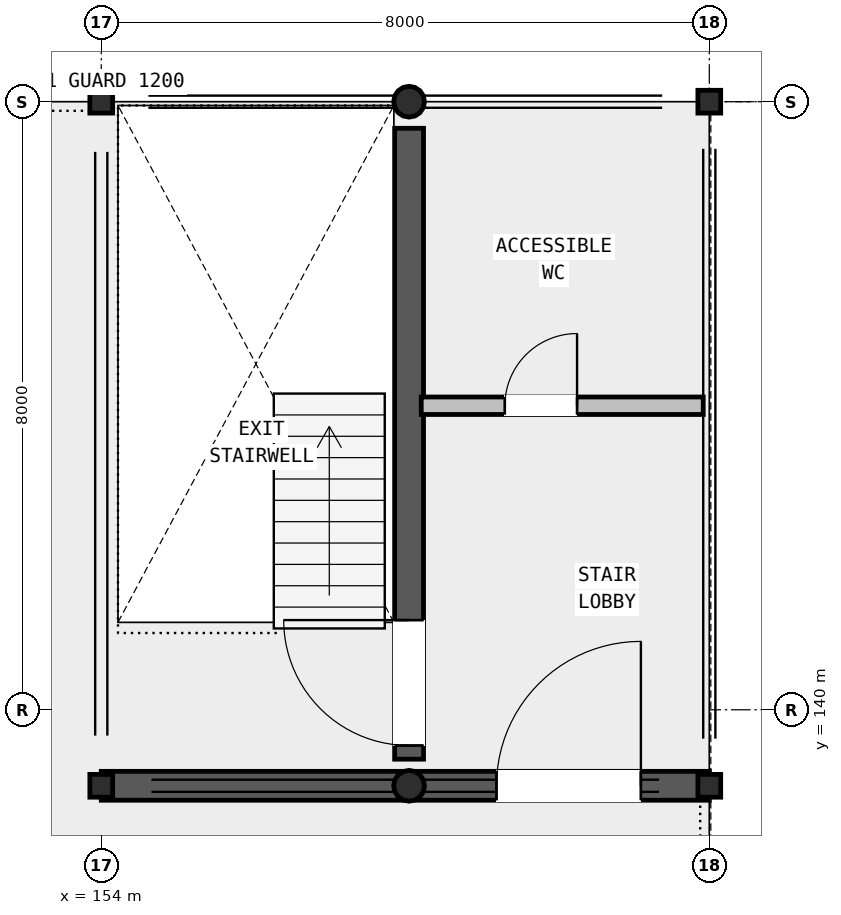
"""IFC4 building model, lengths in metres.
Left out: names, types, materials, properties, quantities, classifications, styles, units other than length and angle.
Written with IfcOpenShell. Run it as: python <this file> out.ifc"""

import sys

from ifc_helpers import new_model, si_unit, direction, frame, frame_2d, origin, origin_2d, place, context, subcontext, project, spatial, rectangle, hollow_circle, i_section, extrude, element, fill, save


model = new_model("IFC4")
c1 = context("Model", 3, precision=1e-05, world=origin(), true_north=direction((0.0, 1.0)))
c2 = subcontext(c1, "Body", "Model", "MODEL_VIEW")
j1 = project(units=[si_unit("LENGTHUNIT", "METRE"), si_unit("PLANEANGLEUNIT", "RADIAN")], contexts=[c1])
p1 = place(None, origin())
s1 = spatial("IfcSite", under=j1, at=p1, CompositionType="ELEMENT")
p2 = place(p1, origin())
s2 = spatial("IfcBuilding", under=s1, at=p2, CompositionType="ELEMENT")
p3 = place(p2, frame((0.0, 0.0, 25.1)))
s3 = spatial("IfcBuildingStorey", under=s2, at=p3, CompositionType="ELEMENT", Elevation=25.1)
for number, where, z_axis, x_axis in (
    (1, (154.0, 148.0, 0.0), (0.0, 0.0, 1.0), (1.0, 0.0, 0.0)),
    (2, (162.0, 148.0, 0.0), (0.0, 0.0, 1.0), (1.0, 0.0, 0.0)),
    (3, (154.0, 139.0, 0.0), (0.0, 0.0, 1.0), (1.0, 0.0, 0.0)),
    (4, (162.0, 139.0, 0.0), (0.0, 0.0, 1.0), (1.0, 0.0, 0.0)),
):
    element("IfcColumn", number, at=place(p3, frame(where, z_axis=z_axis, x_axis=x_axis)), inside=s3, PredefinedType="COLUMN", context=c2, shape_type="SweptSolid", body=[
        extrude(i_section(OverallWidth=0.3, OverallDepth=0.3, WebThickness=0.01, FlangeThickness=0.015, FilletRadius=0.018, at=origin_2d()), origin(), (0.0, 0.0, 1.0), 5.22),
    ])
for number, where, z_axis, x_axis in (
    (5, (158.05, 139.0, 0.0), (0.0, 0.0, 1.0), (1.0, 0.0, 0.0)),
    (6, (158.05, 148.0, 0.0), (0.0, 0.0, 1.0), (1.0, 0.0, 0.0)),
):
    element("IfcColumn", number, at=place(p3, frame(where, z_axis=z_axis, x_axis=x_axis)), inside=s3, PredefinedType="COLUMN", context=c2, shape_type="SweptSolid", body=[
        extrude(hollow_circle(Radius=0.203, WallThickness=0.014, at=origin_2d()), origin(), (0.0, 0.0, 1.0), 5.22),
    ])
p4 = place(p3, frame((154.0, 139.0, 0.0), z_axis=(0.0, 0.0, 1.0), x_axis=(1.0, 0.0, 0.0)))
e7 = element("IfcWall", 7, at=p4, inside=s3, PredefinedType="SHEAR", context=c2, shape_type="SweptSolid", body=[
    extrude(rectangle(XDim=8.0, YDim=0.38, at=frame_2d((4.0, 0.0))), origin(), (0.0, 0.0, 1.0), 2.55),
])
p5 = place(p4, frame((5.2, 0.0, 0.0)))
e8 = element("IfcOpeningElement", 8, at=p5, cuts=e7, PredefinedType="OPENING", context=c2, shape_type="SweptSolid", body=[
    extrude(rectangle(XDim=1.9, YDim=2.3, at=frame_2d((0.95, 1.15))), frame((0.0, 0.2, 0.0), z_axis=(0.0, -1.0, 0.0), x_axis=(1.0, 0.0, 0.0)), (0.0, 0.0, 1.0), 0.4),
])
p6 = place(p3, frame((158.05, 139.35, 0.0), z_axis=(0.0, 0.0, 1.0), x_axis=(0.0, 1.0, 0.0)))
e9 = element("IfcWall", 9, at=p6, inside=s3, PredefinedType="SHEAR", context=c2, shape_type="SweptSolid", body=[
    extrude(rectangle(XDim=8.3, YDim=0.38, at=frame_2d((4.15, 0.0))), origin(), (0.0, 0.0, 1.0), 2.55),
])
p7 = place(p6, frame((0.18, 0.0, 0.0)))
e10 = element("IfcOpeningElement", 10, at=p7, cuts=e9, PredefinedType="OPENING", context=c2, shape_type="SweptSolid", body=[
    extrude(rectangle(XDim=1.65, YDim=2.2, at=frame_2d((0.825, 1.1))), frame((0.0, 0.2, 0.0), z_axis=(0.0, -1.0, 0.0), x_axis=(1.0, 0.0, 0.0)), (0.0, 0.0, 1.0), 0.4),
])
p8 = place(p3, frame((158.21, 144.0, 0.0), z_axis=(0.0, 0.0, 1.0), x_axis=(1.0, 0.0, 0.0)))
e11 = element("IfcWall", 11, at=p8, inside=s3, PredefinedType="PARTITIONING", context=c2, shape_type="SweptSolid", body=[
    extrude(rectangle(XDim=3.71, YDim=0.23, at=frame_2d((1.855, 0.0))), origin(), (0.0, 0.0, 1.0), 2.55),
])
p9 = place(p8, frame((1.1, 0.0, 0.0)))
e12 = element("IfcOpeningElement", 12, at=p9, cuts=e11, PredefinedType="OPENING", context=c2, shape_type="SweptSolid", body=[
    extrude(rectangle(XDim=0.95, YDim=2.1, at=frame_2d((0.475, 1.05))), frame((0.0, 0.125, 0.0), z_axis=(0.0, -1.0, 0.0), x_axis=(1.0, 0.0, 0.0)), (0.0, 0.0, 1.0), 0.25),
])
p10 = place(p5, origin())
e13 = element("IfcDoor", 13, at=p10, inside=s3, OperationType="SINGLE_SWING_RIGHT", PredefinedType="DOOR", context=c2, shape_type="SweptSolid", body=[
    extrude(rectangle(XDim=1.9, YDim=2.3, at=frame_2d((0.95, 1.15))), frame((0.0, 0.025, 0.0), z_axis=(0.0, -1.0, 0.0), x_axis=(1.0, 0.0, 0.0)), (0.0, 0.0, 1.0), 0.05),
])
fill(e8, e13)
p11 = place(p7, origin())
e14 = element("IfcDoor", 14, at=p11, inside=s3, OperationType="SINGLE_SWING_RIGHT", PredefinedType="DOOR", context=c2, shape_type="SweptSolid", body=[
    extrude(rectangle(XDim=1.65, YDim=2.2, at=frame_2d((0.825, 1.1))), frame((0.0, 0.025, 0.0), z_axis=(0.0, -1.0, 0.0), x_axis=(1.0, 0.0, 0.0)), (0.0, 0.0, 1.0), 0.05),
])
fill(e10, e14)
p12 = place(p9, origin())
e15 = element("IfcDoor", 15, at=p12, inside=s3, OperationType="SINGLE_SWING_RIGHT", PredefinedType="DOOR", context=c2, shape_type="SweptSolid", body=[
    extrude(rectangle(XDim=0.95, YDim=2.1, at=frame_2d((0.475, 1.05))), frame((0.0, 0.025, 0.0), z_axis=(0.0, -1.0, 0.0), x_axis=(1.0, 0.0, 0.0)), (0.0, 0.0, 1.0), 0.05),
])
fill(e12, e15)
save(model, sys.argv[1])
